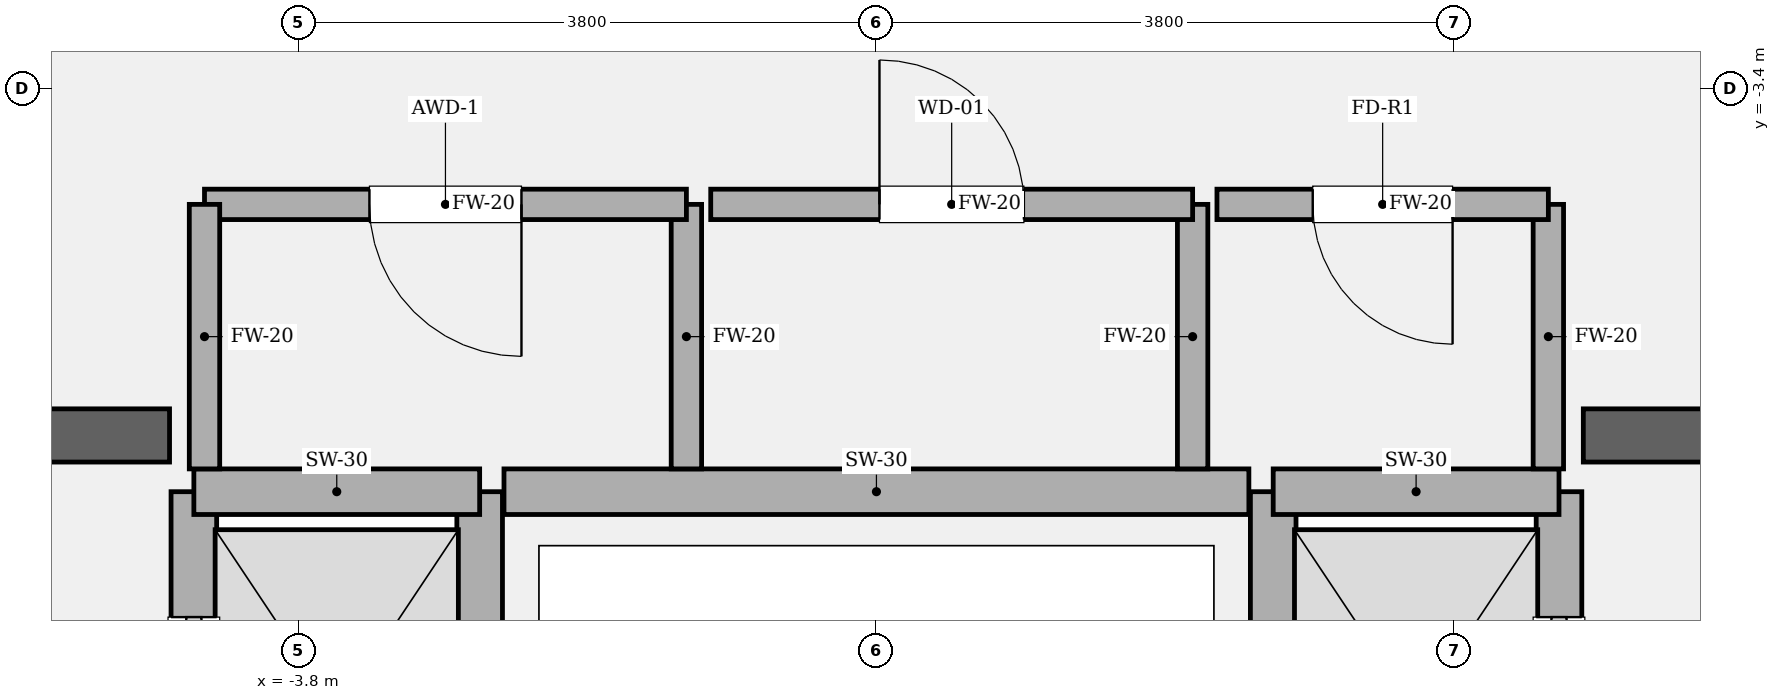
"""IFC4 building model, lengths in metres.
Left out: names, types, materials, properties, quantities, classifications, styles, units other than length and angle.
Written with IfcOpenShell. Run it as: python <this file> out.ifc"""

import sys

from ifc_helpers import new_model, si_unit, direction, frame, frame_2d, origin, place, context, subcontext, project, spatial, rectangle, extrude, element, fill, save


model = new_model("IFC4")
c1 = context("Model", 3, precision=1e-05, world=origin(), true_north=direction((0.0, 1.0)))
c2 = subcontext(c1, "Body", "Model", "MODEL_VIEW")
j1 = project(units=[si_unit("LENGTHUNIT", "METRE"), si_unit("PLANEANGLEUNIT", "RADIAN")], contexts=[c1])
p1 = place(None, origin())
s1 = spatial("IfcSite", under=j1, at=p1, CompositionType="ELEMENT")
p2 = place(p1, origin())
s2 = spatial("IfcBuilding", under=s1, at=p2, CompositionType="ELEMENT")
p3 = place(p2, frame((0.0, 0.0, 22.2)))
s3 = spatial("IfcBuildingStorey", under=s2, at=p3, CompositionType="ELEMENT", Elevation=22.2)
p4 = place(p3, frame((-9.825, -5.68, 0.0), z_axis=(0.0, 0.0, 1.0), x_axis=(1.0, 0.0, 0.0)))
e1 = element("IfcWall", 1, at=p4, inside=s3, PredefinedType="SOLIDWALL", context=c2, shape_type="SweptSolid", body=[
    extrude(rectangle(XDim=5.175, YDim=0.35, at=frame_2d((2.587, 0.0))), origin(), (0.0, 0.0, 1.0), 6.0),
])
p5 = place(p4, frame((1.285, 0.0, 0.0)))
e2 = element("IfcOpeningElement", 2, at=p5, cuts=e1, PredefinedType="OPENING", context=c2, shape_type="SweptSolid", body=[
    extrude(rectangle(XDim=1.18, YDim=2.2, at=frame_2d((0.59, 1.1))), frame((0.0, 0.185, 0.0), z_axis=(0.0, -1.0, 0.0), x_axis=(1.0, 0.0, 0.0)), (0.0, 0.0, 1.0), 0.37),
])
p6 = place(p3, frame((4.65, -5.68, 0.0), z_axis=(0.0, 0.0, 1.0), x_axis=(1.0, 0.0, 0.0)))
e3 = element("IfcWall", 3, at=p6, inside=s3, PredefinedType="SOLIDWALL", context=c2, shape_type="SweptSolid", body=[
    extrude(rectangle(XDim=5.175, YDim=0.35, at=frame_2d((2.587, 0.0))), origin(), (0.0, 0.0, 1.0), 6.0),
])
p7 = place(p6, frame((2.71, 0.0, 0.0)))
e4 = element("IfcOpeningElement", 4, at=p7, cuts=e3, PredefinedType="OPENING", context=c2, shape_type="SweptSolid", body=[
    extrude(rectangle(XDim=1.18, YDim=2.2, at=frame_2d((0.59, 1.1))), frame((0.0, 0.185, 0.0), z_axis=(0.0, -1.0, 0.0), x_axis=(1.0, 0.0, 0.0)), (0.0, 0.0, 1.0), 0.37),
])
p8 = place(p3, frame((-4.49, -8.82, 0.0), z_axis=(0.0, 0.0, 1.0), x_axis=(0.0, 1.0, 0.0)))
e5 = element("IfcWall", 5, at=p8, inside=s3, PredefinedType="SOLIDWALL", context=c2, shape_type="SweptSolid", body=[
    extrude(rectangle(XDim=2.77, YDim=0.3, at=frame_2d((1.385, 0.0))), origin(), (0.0, 0.0, 1.0), 5.72),
])
p9 = place(p8, frame((0.825, 0.0, 0.0)))
e6 = element("IfcOpeningElement", 6, at=p9, cuts=e5, PredefinedType="OPENING", context=c2, shape_type="SweptSolid", body=[
    extrude(rectangle(XDim=1.12, YDim=2.25, at=frame_2d((0.56, 1.125))), frame((0.0, 0.16, 0.0), z_axis=(0.0, -1.0, 0.0), x_axis=(1.0, 0.0, 0.0)), (0.0, 0.0, 1.0), 0.32),
])
p10 = place(p3, frame((-2.61, -8.82, 0.0), z_axis=(0.0, 0.0, 1.0), x_axis=(0.0, 1.0, 0.0)))
e7 = element("IfcWall", 7, at=p10, inside=s3, PredefinedType="SOLIDWALL", context=c2, shape_type="SweptSolid", body=[
    extrude(rectangle(XDim=2.77, YDim=0.3, at=frame_2d((1.385, 0.0))), origin(), (0.0, 0.0, 1.0), 5.72),
])
p11 = place(p3, frame((-4.49, -6.05, 0.0), z_axis=(0.0, 0.0, 1.0), x_axis=(1.0, 0.0, 0.0)))
e8 = element("IfcWall", 8, at=p11, inside=s3, PredefinedType="SOLIDWALL", context=c2, shape_type="SweptSolid", body=[
    extrude(rectangle(XDim=1.88, YDim=0.3, at=frame_2d((0.94, 0.0))), origin(), (0.0, 0.0, 1.0), 5.72),
])
p12 = place(p3, frame((4.49, -8.82, 0.0), z_axis=(0.0, 0.0, 1.0), x_axis=(0.0, 1.0, 0.0)))
e9 = element("IfcWall", 9, at=p12, inside=s3, PredefinedType="SOLIDWALL", context=c2, shape_type="SweptSolid", body=[
    extrude(rectangle(XDim=2.77, YDim=0.3, at=frame_2d((1.385, 0.0))), origin(), (0.0, 0.0, 1.0), 5.72),
])
p13 = place(p12, frame((0.825, 0.0, 0.0)))
e10 = element("IfcOpeningElement", 10, at=p13, cuts=e9, PredefinedType="OPENING", context=c2, shape_type="SweptSolid", body=[
    extrude(rectangle(XDim=1.12, YDim=2.25, at=frame_2d((0.56, 1.125))), frame((0.0, 0.16, 0.0), z_axis=(0.0, -1.0, 0.0), x_axis=(1.0, 0.0, 0.0)), (0.0, 0.0, 1.0), 0.32),
])
p14 = place(p3, frame((2.61, -8.82, 0.0), z_axis=(0.0, 0.0, 1.0), x_axis=(0.0, 1.0, 0.0)))
e11 = element("IfcWall", 11, at=p14, inside=s3, PredefinedType="SOLIDWALL", context=c2, shape_type="SweptSolid", body=[
    extrude(rectangle(XDim=2.77, YDim=0.3, at=frame_2d((1.385, 0.0))), origin(), (0.0, 0.0, 1.0), 5.72),
])
p15 = place(p3, frame((2.61, -6.05, 0.0), z_axis=(0.0, 0.0, 1.0), x_axis=(1.0, 0.0, 0.0)))
e12 = element("IfcWall", 12, at=p15, inside=s3, PredefinedType="SOLIDWALL", context=c2, shape_type="SweptSolid", body=[
    extrude(rectangle(XDim=1.88, YDim=0.3, at=frame_2d((0.94, 0.0))), origin(), (0.0, 0.0, 1.0), 5.72),
])
p16 = place(p3, frame((-2.45, -6.05, 0.0), z_axis=(0.0, 0.0, 1.0), x_axis=(1.0, 0.0, 0.0)))
e13 = element("IfcWall", 13, at=p16, inside=s3, PredefinedType="SOLIDWALL", context=c2, shape_type="SweptSolid", body=[
    extrude(rectangle(XDim=4.9, YDim=0.3, at=frame_2d((2.45, 0.0))), origin(), (0.0, 0.0, 1.0), 5.72),
])
p17 = place(p3, frame((-1.25, -5.9, 0.0), z_axis=(0.0, 0.0, 1.0), x_axis=(0.0, 1.0, 0.0)))
e14 = element("IfcWall", 14, at=p17, inside=s3, PredefinedType="SOLIDWALL", context=c2, shape_type="SweptSolid", body=[
    extrude(rectangle(XDim=1.74, YDim=0.2, at=frame_2d((0.87, 0.0))), origin(), (0.0, 0.0, 1.0), 5.72),
])
p18 = place(p3, frame((-1.25, -4.16, 0.0), z_axis=(0.0, 0.0, 1.0), x_axis=(-1.0, 0.0, 0.0)))
e15 = element("IfcWall", 15, at=p18, inside=s3, PredefinedType="SOLIDWALL", context=c2, shape_type="SweptSolid", body=[
    extrude(rectangle(XDim=3.17, YDim=0.2, at=frame_2d((1.585, 0.0))), origin(), (0.0, 0.0, 1.0), 5.72),
])
p19 = place(p18, frame((1.085, 0.0, 0.0)))
e16 = element("IfcOpeningElement", 16, at=p19, cuts=e15, PredefinedType="OPENING", context=c2, shape_type="SweptSolid", body=[
    extrude(rectangle(XDim=1.0, YDim=2.15, at=frame_2d((0.5, 1.075))), frame((0.0, 0.11, 0.0), z_axis=(0.0, -1.0, 0.0), x_axis=(1.0, 0.0, 0.0)), (0.0, 0.0, 1.0), 0.22),
])
for number, where, z_axis, x_axis in (
    (17, (-4.42, -4.16, 0.0), (0.0, 0.0, 1.0), (0.0, -1.0, 0.0)),
    (18, (2.08, -5.9, 0.0), (0.0, 0.0, 1.0), (0.0, 1.0, 0.0)),
):
    element("IfcWall", number, at=place(p3, frame(where, z_axis=z_axis, x_axis=x_axis)), inside=s3, PredefinedType="SOLIDWALL", context=c2, shape_type="SweptSolid", body=[
        extrude(rectangle(XDim=1.74, YDim=0.2, at=frame_2d((0.87, 0.0))), origin(), (0.0, 0.0, 1.0), 5.72),
    ])
p20 = place(p3, frame((2.08, -4.16, 0.0), z_axis=(0.0, 0.0, 1.0), x_axis=(-1.0, 0.0, 0.0)))
e19 = element("IfcWall", 19, at=p20, inside=s3, PredefinedType="SOLIDWALL", context=c2, shape_type="SweptSolid", body=[
    extrude(rectangle(XDim=3.17, YDim=0.2, at=frame_2d((1.585, 0.0))), origin(), (0.0, 0.0, 1.0), 5.72),
])
p21 = place(p20, frame((1.11, 0.0, 0.0)))
e20 = element("IfcOpeningElement", 20, at=p21, cuts=e19, PredefinedType="OPENING", context=c2, shape_type="SweptSolid", body=[
    extrude(rectangle(XDim=0.95, YDim=2.15, at=frame_2d((0.475, 1.075))), frame((0.0, 0.11, 0.0), z_axis=(0.0, -1.0, 0.0), x_axis=(1.0, 0.0, 0.0)), (0.0, 0.0, 1.0), 0.22),
])
p22 = place(p3, frame((4.42, -5.9, 0.0), z_axis=(0.0, 0.0, 1.0), x_axis=(0.0, 1.0, 0.0)))
e21 = element("IfcWall", 21, at=p22, inside=s3, PredefinedType="SOLIDWALL", context=c2, shape_type="SweptSolid", body=[
    extrude(rectangle(XDim=1.74, YDim=0.2, at=frame_2d((0.87, 0.0))), origin(), (0.0, 0.0, 1.0), 5.72),
])
p23 = place(p3, frame((4.42, -4.16, 0.0), z_axis=(0.0, 0.0, 1.0), x_axis=(-1.0, 0.0, 0.0)))
e22 = element("IfcWall", 22, at=p23, inside=s3, PredefinedType="SOLIDWALL", context=c2, shape_type="SweptSolid", body=[
    extrude(rectangle(XDim=2.18, YDim=0.2, at=frame_2d((1.09, 0.0))), origin(), (0.0, 0.0, 1.0), 5.72),
])
p24 = place(p23, frame((0.63, 0.0, 0.0)))
e23 = element("IfcOpeningElement", 23, at=p24, cuts=e22, PredefinedType="OPENING", context=c2, shape_type="SweptSolid", body=[
    extrude(rectangle(XDim=0.92, YDim=2.1, at=frame_2d((0.46, 1.05))), frame((0.0, 0.11, 0.0), z_axis=(0.0, -1.0, 0.0), x_axis=(1.0, 0.0, 0.0)), (0.0, 0.0, 1.0), 0.22),
])
p25 = place(p9, origin())
e24 = element("IfcDoor", 24, at=p25, inside=s3, OperationType="SLIDING_TO_LEFT", PredefinedType="DOOR", context=c2, shape_type="SweptSolid", body=[
    extrude(rectangle(XDim=1.12, YDim=2.25, at=frame_2d((0.56, 1.125))), frame((0.0, 0.025, 0.0), z_axis=(0.0, -1.0, 0.0), x_axis=(1.0, 0.0, 0.0)), (0.0, 0.0, 1.0), 0.05),
])
fill(e6, e24)
p26 = place(p13, origin())
e25 = element("IfcDoor", 25, at=p26, inside=s3, OperationType="SLIDING_TO_RIGHT", PredefinedType="DOOR", context=c2, shape_type="SweptSolid", body=[
    extrude(rectangle(XDim=1.12, YDim=2.25, at=frame_2d((0.56, 1.125))), frame((0.0, 0.025, 0.0), z_axis=(0.0, -1.0, 0.0), x_axis=(1.0, 0.0, 0.0)), (0.0, 0.0, 1.0), 0.05),
])
fill(e10, e25)
p27 = place(p19, origin())
e26 = element("IfcDoor", 26, at=p27, inside=s3, OperationType="SINGLE_SWING_LEFT", PredefinedType="DOOR", context=c2, shape_type="SweptSolid", body=[
    extrude(rectangle(XDim=1.0, YDim=2.15, at=frame_2d((0.5, 1.075))), frame((0.0, 0.025, 0.0), z_axis=(0.0, -1.0, 0.0), x_axis=(1.0, 0.0, 0.0)), (0.0, 0.0, 1.0), 0.05),
])
fill(e16, e26)
p28 = place(p21, origin())
e27 = element("IfcDoor", 27, at=p28, inside=s3, OperationType="SINGLE_SWING_RIGHT", PredefinedType="DOOR", context=c2, shape_type="SweptSolid", body=[
    extrude(rectangle(XDim=0.95, YDim=2.15, at=frame_2d((0.475, 1.075))), frame((0.0, 0.025, 0.0), z_axis=(0.0, -1.0, 0.0), x_axis=(1.0, 0.0, 0.0)), (0.0, 0.0, 1.0), 0.05),
])
fill(e20, e27)
p29 = place(p24, origin())
e28 = element("IfcDoor", 28, at=p29, inside=s3, OperationType="SINGLE_SWING_LEFT", PredefinedType="DOOR", context=c2, shape_type="SweptSolid", body=[
    extrude(rectangle(XDim=0.92, YDim=2.1, at=frame_2d((0.46, 1.05))), frame((0.0, 0.025, 0.0), z_axis=(0.0, -1.0, 0.0), x_axis=(1.0, 0.0, 0.0)), (0.0, 0.0, 1.0), 0.05),
])
fill(e23, e28)
save(model, sys.argv[1])
